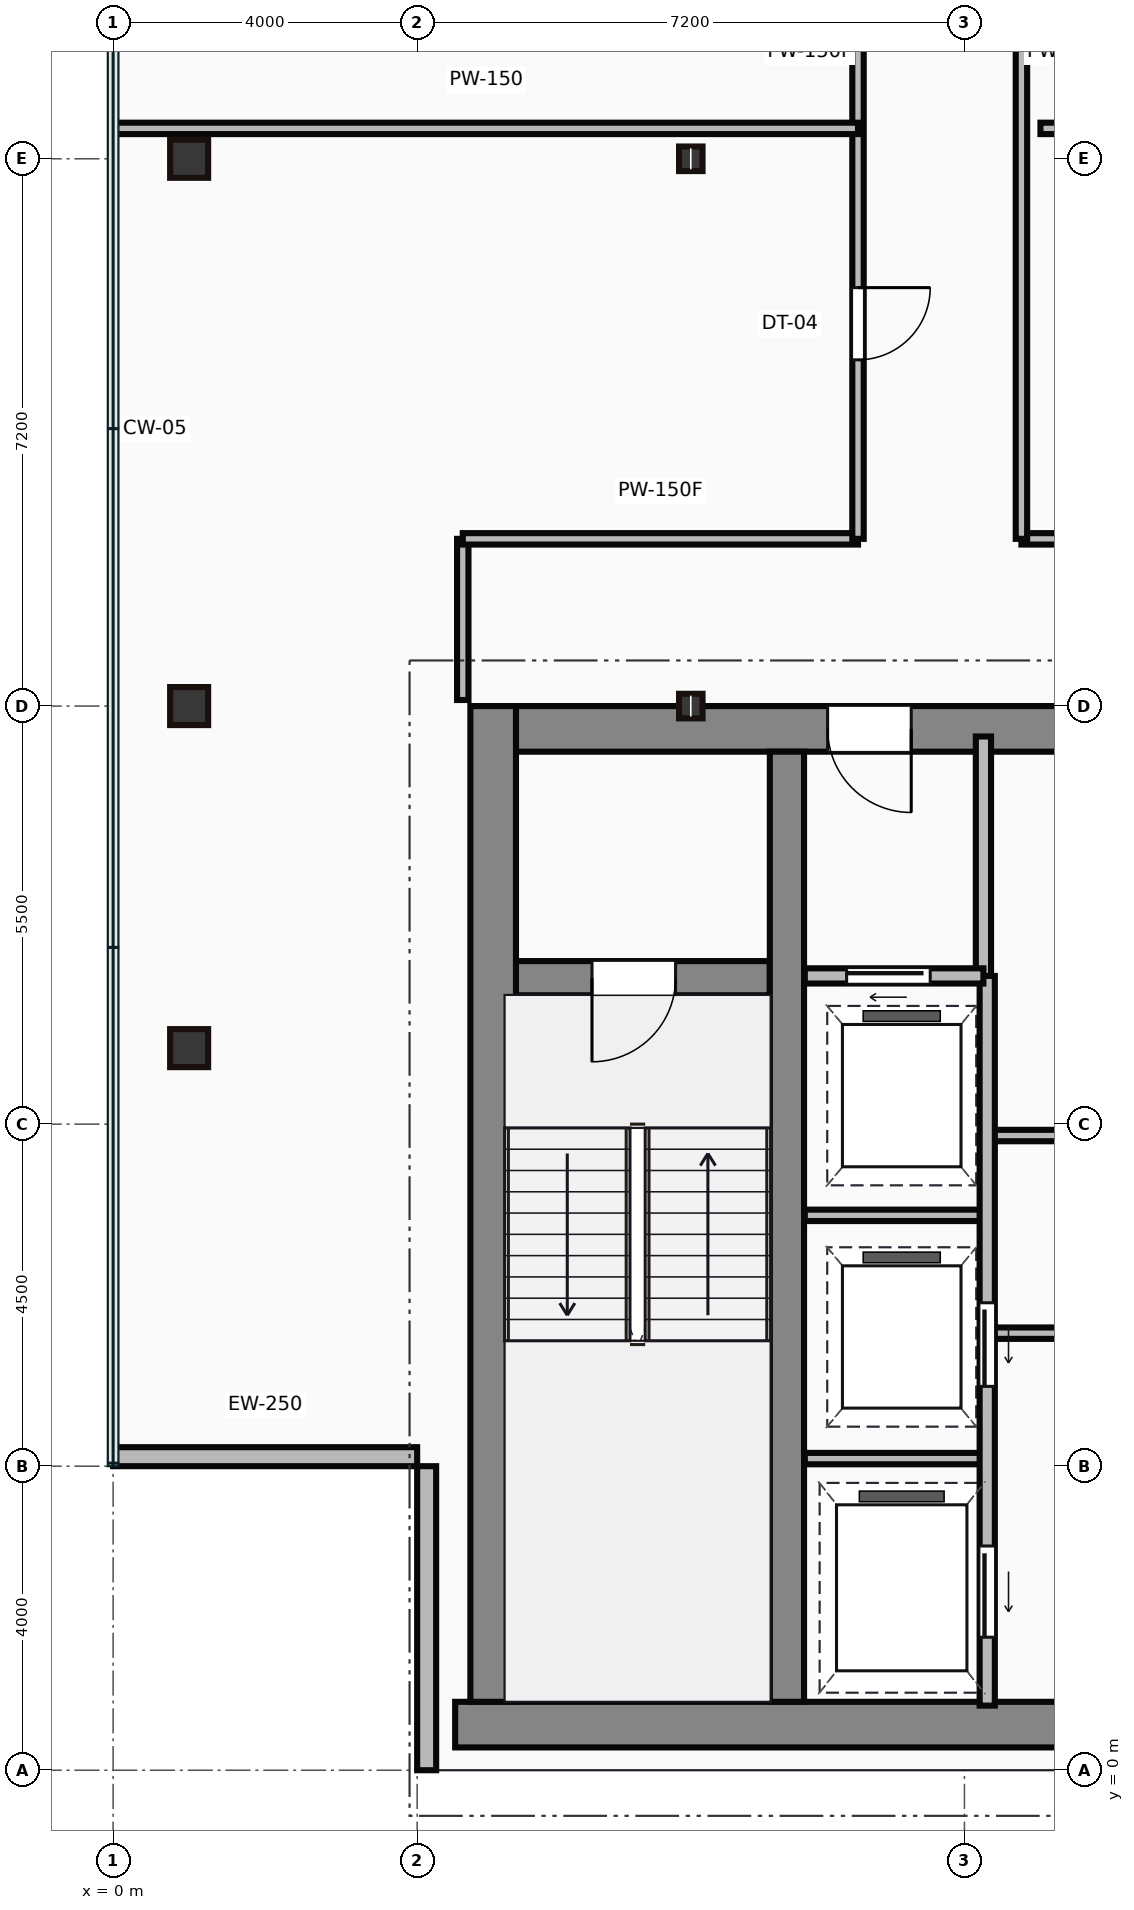
"""IFC4 building model, lengths in metres.
Left out: names, types, materials, properties, quantities, classifications, styles, units other than length and angle.
Written with IfcOpenShell. Run it as: python <this file> out.ifc"""

import sys

from ifc_helpers import new_model, si_unit, direction, frame, frame_2d, origin, origin_2d, place, context, subcontext, project, spatial, rectangle, hollow_rectangle, i_section, extrude, source, transform, mapped, element, fill, save


model = new_model("IFC4")
c1 = context("Model", 3, precision=1e-05, world=origin(), true_north=direction((0.0, 1.0)))
c2 = subcontext(c1, "Body", "Model", "MODEL_VIEW")
j1 = project(units=[si_unit("LENGTHUNIT", "METRE"), si_unit("PLANEANGLEUNIT", "RADIAN")], contexts=[c1])
p1 = place(None, origin())
s1 = spatial("IfcSite", under=j1, at=p1, CompositionType="ELEMENT")
p2 = place(p1, origin())
s2 = spatial("IfcBuilding", under=s1, at=p2, CompositionType="ELEMENT")
p3 = place(p2, frame((0.0, 0.0, 255.15)))
s3 = spatial("IfcBuildingStorey", under=s2, at=p3, CompositionType="ELEMENT", Elevation=255.15)
m1 = source(origin(), c2, "Body", "SweptSolid", [
    extrude(rectangle(XDim=29.5, YDim=0.6, at=frame_2d((14.75, 0.0))), origin(), (0.0, 0.0, 1.0), 3.65),
])
p4 = place(p3, frame((4.5, 0.6, 0.0), z_axis=(0.0, 0.0, 1.0), x_axis=(1.0, 0.0, 0.0)))
e1 = element("IfcWall", 1, at=p4, inside=s3, PredefinedType="SHEAR", context=c2, shape_type="MappedRepresentation", body=[
    mapped(m1, transform((0.0, 0.0, 0.0))),
])
m2 = source(origin(), c2, "Body", "SweptSolid", [
    extrude(rectangle(XDim=13.1, YDim=0.6, at=frame_2d((6.55, 0.0))), origin(), (0.0, 0.0, 1.0), 3.65),
])
p5 = place(p3, frame((5.0, 0.9, 0.0), z_axis=(0.0, 0.0, 1.0), x_axis=(0.0, 1.0, 0.0)))
e2 = element("IfcWall", 2, at=p5, inside=s3, PredefinedType="SHEAR", context=c2, shape_type="MappedRepresentation", body=[
    mapped(m2, transform((0.0, 0.0, 0.0))),
])
m3 = source(origin(), c2, "Body", "SweptSolid", [
    extrude(rectangle(XDim=9.1, YDim=0.6, at=frame_2d((4.55, 0.0))), origin(), (0.0, 0.0, 1.0), 3.65),
])
p6 = place(p3, frame((5.3, 13.7, 0.0), z_axis=(0.0, 0.0, 1.0), x_axis=(1.0, 0.0, 0.0)))
e3 = element("IfcWall", 3, at=p6, inside=s3, PredefinedType="SHEAR", context=c2, shape_type="MappedRepresentation", body=[
    mapped(m3, transform((0.0, 0.0, 0.0))),
])
p7 = place(p6, frame((4.1, 0.0, 0.0)))
e4 = element("IfcOpeningElement", 4, at=p7, cuts=e3, PredefinedType="OPENING", context=c2, shape_type="SweptSolid", body=[
    extrude(rectangle(XDim=1.1, YDim=2.15, at=frame_2d((0.55, 1.075))), frame((0.0, 0.31, 0.0), z_axis=(0.0, -1.0, 0.0), x_axis=(1.0, 0.0, 0.0)), (0.0, 0.0, 1.0), 0.62),
])
m4 = source(origin(), c2, "Body", "SweptSolid", [
    extrude(rectangle(XDim=12.5, YDim=0.45, at=frame_2d((6.25, 0.0))), origin(), (0.0, 0.0, 1.0), 3.65),
])
p8 = place(p3, frame((8.865, 0.9, 0.0), z_axis=(0.0, 0.0, 1.0), x_axis=(0.0, 1.0, 0.0)))
e5 = element("IfcWall", 5, at=p8, inside=s3, PredefinedType="SHEAR", context=c2, shape_type="MappedRepresentation", body=[
    mapped(m4, transform((0.0, 0.0, 0.0))),
])
m5 = source(origin(), c2, "Body", "SweptSolid", [
    extrude(rectangle(XDim=3.39, YDim=0.45, at=frame_2d((1.695, 0.0))), origin(), (0.0, 0.0, 1.0), 3.65),
])
p9 = place(p3, frame((5.25, 10.42, 0.0), z_axis=(0.0, 0.0, 1.0), x_axis=(1.0, 0.0, 0.0)))
e6 = element("IfcWall", 6, at=p9, inside=s3, PredefinedType="SHEAR", context=c2, shape_type="MappedRepresentation", body=[
    mapped(m5, transform((0.0, 0.0, 0.0))),
])
p10 = place(p9, frame((1.05, 0.0, 0.0)))
e7 = element("IfcOpeningElement", 7, at=p10, cuts=e6, PredefinedType="OPENING", context=c2, shape_type="SweptSolid", body=[
    extrude(rectangle(XDim=1.1, YDim=2.15, at=frame_2d((0.55, 1.075))), frame((0.0, 0.235, 0.0), z_axis=(0.0, -1.0, 0.0), x_axis=(1.0, 0.0, 0.0)), (0.0, 0.0, 1.0), 0.47),
])
m6 = source(origin(), c2, "Body", "SweptSolid", [
    extrude(hollow_rectangle(XDim=0.5, YDim=0.5, WallThickness=0.022, at=origin_2d()), origin(), (0.0, 0.0, 1.0), 3.65),
])
for number, where, z_axis, x_axis in (
    (8, (1.0, 9.5, 0.0), (0.0, 0.0, 1.0), (1.0, 0.0, 0.0)),
    (9, (1.0, 14.0, 0.0), (0.0, 0.0, 1.0), (1.0, 0.0, 0.0)),
    (10, (1.0, 21.2, 0.0), (0.0, 0.0, 1.0), (1.0, 0.0, 0.0)),
):
    element("IfcColumn", number, at=place(p3, frame(where, z_axis=z_axis, x_axis=x_axis)), inside=s3, PredefinedType="COLUMN", context=c2, shape_type="MappedRepresentation", body=[
        mapped(m6, transform((0.0, 0.0, 0.0))),
    ])
m7 = source(origin(), c2, "Body", "SweptSolid", [
    extrude(i_section(OverallWidth=0.309, OverallDepth=0.323, WebThickness=0.014, FlangeThickness=0.023, at=origin_2d()), origin(), (0.0, 0.0, 1.0), 3.65),
])
for number, where, z_axis, x_axis in (
    (11, (7.6, 14.0, 0.0), (0.0, 0.0, 1.0), (1.0, 0.0, 0.0)),
    (12, (7.6, 21.2, 0.0), (0.0, 0.0, 1.0), (1.0, 0.0, 0.0)),
):
    element("IfcColumn", number, at=place(p3, frame(where, z_axis=z_axis, x_axis=x_axis)), inside=s3, PredefinedType="COLUMN", context=c2, shape_type="MappedRepresentation", body=[
        mapped(m7, transform((0.0, 0.0, 0.0))),
    ])
m8 = source(origin(), c2, "Body", "SweptSolid", [
    extrude(rectangle(XDim=4.0, YDim=0.25, at=frame_2d((2.0, 0.0))), origin(), (0.0, 0.0, 1.0), 3.4),
])
for number, where, z_axis, x_axis in (
    (13, (0.0, 4.125, 0.0), (0.0, 0.0, 1.0), (1.0, 0.0, 0.0)),
    (14, (4.125, 4.0, 0.0), (0.0, 0.0, 1.0), (0.0, -1.0, 0.0)),
):
    element("IfcWall", number, at=place(p3, frame(where, z_axis=z_axis, x_axis=x_axis)), inside=s3, PredefinedType="STANDARD", context=c2, shape_type="MappedRepresentation", body=[
        mapped(m8, transform((0.0, 0.0, 0.0))),
    ])
m9 = source(origin(), c2, "Body", "SweptSolid", [
    extrude(rectangle(XDim=3.18, YDim=0.2, at=frame_2d((1.59, 0.0))), origin(), (0.0, 0.0, 1.0), 3.4),
])
p11 = place(p3, frame((11.45, 10.42, 0.0), z_axis=(0.0, 0.0, 1.0), x_axis=(0.0, 1.0, 0.0)))
e15 = element("IfcWall", 15, at=p11, inside=s3, PredefinedType="PARTITIONING", context=c2, shape_type="MappedRepresentation", body=[
    mapped(m9, transform((0.0, 0.0, 0.0))),
])
m10 = source(origin(), c2, "Body", "SweptSolid", [
    extrude(rectangle(XDim=2.35, YDim=0.2, at=frame_2d((1.175, 0.0))), origin(), (0.0, 0.0, 1.0), 3.4),
])
p12 = place(p3, frame((9.1, 10.45, 0.0), z_axis=(0.0, 0.0, 1.0), x_axis=(1.0, 0.0, 0.0)))
e16 = element("IfcWall", 16, at=p12, inside=s3, PredefinedType="PARTITIONING", context=c2, shape_type="MappedRepresentation", body=[
    mapped(m10, transform((0.0, 0.0, 0.0))),
])
p13 = place(p12, frame((0.55, 0.0, 0.0)))
e17 = element("IfcOpeningElement", 17, at=p13, cuts=e16, PredefinedType="OPENING", context=c2, shape_type="SweptSolid", body=[
    extrude(rectangle(XDim=1.1, YDim=2.15, at=frame_2d((0.55, 1.075))), frame((0.0, 0.11, 0.0), z_axis=(0.0, -1.0, 0.0), x_axis=(1.0, 0.0, 0.0)), (0.0, 0.0, 1.0), 0.22),
])
m11 = source(origin(), c2, "Body", "SweptSolid", [
    extrude(rectangle(XDim=9.6, YDim=0.2, at=frame_2d((4.8, 0.0))), origin(), (0.0, 0.0, 1.0), 3.4),
])
p14 = place(p3, frame((11.5, 0.85, 0.0), z_axis=(0.0, 0.0, 1.0), x_axis=(0.0, 1.0, 0.0)))
e18 = element("IfcWall", 18, at=p14, inside=s3, PredefinedType="PARTITIONING", context=c2, shape_type="MappedRepresentation", body=[
    mapped(m11, transform((0.0, 0.0, 0.0))),
])
p15 = place(p14, frame((4.2, 0.0, 0.0)))
e19 = element("IfcOpeningElement", 19, at=p15, cuts=e18, PredefinedType="OPENING", context=c2, shape_type="SweptSolid", body=[
    extrude(rectangle(XDim=1.1, YDim=2.15, at=frame_2d((0.55, 1.075))), frame((0.0, 0.11, 0.0), z_axis=(0.0, -1.0, 0.0), x_axis=(1.0, 0.0, 0.0)), (0.0, 0.0, 1.0), 0.22),
])
p16 = place(p14, frame((0.9, 0.0, 0.0)))
e20 = element("IfcOpeningElement", 20, at=p16, cuts=e18, PredefinedType="OPENING", context=c2, shape_type="SweptSolid", body=[
    extrude(rectangle(XDim=1.2, YDim=2.15, at=frame_2d((0.6, 1.075))), frame((0.0, 0.11, 0.0), z_axis=(0.0, -1.0, 0.0), x_axis=(1.0, 0.0, 0.0)), (0.0, 0.0, 1.0), 0.22),
])
m12 = source(origin(), c2, "Body", "SweptSolid", [
    extrude(rectangle(XDim=2.4, YDim=0.15, at=frame_2d((1.2, 0.0))), origin(), (0.0, 0.0, 1.0), 3.4),
])
for number, where, z_axis, x_axis in (
    (21, (9.1, 4.1, 0.0), (0.0, 0.0, 1.0), (1.0, 0.0, 0.0)),
    (22, (9.1, 7.3, 0.0), (0.0, 0.0, 1.0), (1.0, 0.0, 0.0)),
):
    element("IfcWall", number, at=place(p3, frame(where, z_axis=z_axis, x_axis=x_axis)), inside=s3, PredefinedType="PARTITIONING", context=c2, shape_type="MappedRepresentation", body=[
        mapped(m12, transform((0.0, 0.0, 0.0))),
    ])
m13 = source(origin(), c2, "Body", "SweptSolid", [
    extrude(rectangle(XDim=11.85, YDim=0.15, at=frame_2d((5.925, 0.0))), origin(), (0.0, 0.0, 1.0), 3.4),
])
p17 = place(p3, frame((11.55, 5.75, 0.0), z_axis=(0.0, 0.0, 1.0), x_axis=(1.0, 0.0, 0.0)))
e23 = element("IfcWall", 23, at=p17, inside=s3, PredefinedType="PARTITIONING", context=c2, shape_type="MappedRepresentation", body=[
    mapped(m13, transform((0.0, 0.0, 0.0))),
])
p18 = place(p3, frame((11.55, 8.35, 0.0), z_axis=(0.0, 0.0, 1.0), x_axis=(1.0, 0.0, 0.0)))
e24 = element("IfcWall", 24, at=p18, inside=s3, PredefinedType="PARTITIONING", context=c2, shape_type="MappedRepresentation", body=[
    mapped(m13, transform((0.0, 0.0, 0.0))),
])
p19 = place(p18, frame((1.1, 0.0, 0.0)))
e25 = element("IfcOpeningElement", 25, at=p19, cuts=e24, PredefinedType="OPENING", context=c2, shape_type="SweptSolid", body=[
    extrude(rectangle(XDim=0.95, YDim=2.15, at=frame_2d((0.475, 1.075))), frame((0.0, 0.085, 0.0), z_axis=(0.0, -1.0, 0.0), x_axis=(1.0, 0.0, 0.0)), (0.0, 0.0, 1.0), 0.17),
])
p20 = place(p18, frame((9.4, 0.0, 0.0)))
e26 = element("IfcOpeningElement", 26, at=p20, cuts=e24, PredefinedType="OPENING", context=c2, shape_type="SweptSolid", body=[
    extrude(rectangle(XDim=0.95, YDim=2.15, at=frame_2d((0.475, 1.075))), frame((0.0, 0.085, 0.0), z_axis=(0.0, -1.0, 0.0), x_axis=(1.0, 0.0, 0.0)), (0.0, 0.0, 1.0), 0.17),
])
m14 = source(origin(), c2, "Body", "SweptSolid", [
    extrude(rectangle(XDim=2.12, YDim=0.15, at=frame_2d((1.06, 0.0))), origin(), (0.0, 0.0, 1.0), 3.4),
])
p21 = place(p3, frame((4.6, 14.08, 0.0), z_axis=(0.0, 0.0, 1.0), x_axis=(0.0, 1.0, 0.0)))
e27 = element("IfcWall", 27, at=p21, inside=s3, PredefinedType="PARTITIONING", context=c2, shape_type="MappedRepresentation", body=[
    mapped(m14, transform((0.0, 0.0, 0.0))),
])
m15 = source(origin(), c2, "Body", "SweptSolid", [
    extrude(rectangle(XDim=5.2, YDim=0.15, at=frame_2d((2.6, 0.0))), origin(), (0.0, 0.0, 1.0), 3.4),
])
p22 = place(p3, frame((4.6, 16.2, 0.0), z_axis=(0.0, 0.0, 1.0), x_axis=(1.0, 0.0, 0.0)))
e28 = element("IfcWall", 28, at=p22, inside=s3, PredefinedType="PARTITIONING", context=c2, shape_type="MappedRepresentation", body=[
    mapped(m15, transform((0.0, 0.0, 0.0))),
])
m16 = source(origin(), c2, "Body", "SweptSolid", [
    extrude(rectangle(XDim=12.8, YDim=0.15, at=frame_2d((6.4, 0.0))), origin(), (0.0, 0.0, 1.0), 3.4),
])
p23 = place(p3, frame((9.8, 16.2, 0.0), z_axis=(0.0, 0.0, 1.0), x_axis=(0.0, 1.0, 0.0)))
e29 = element("IfcWall", 29, at=p23, inside=s3, PredefinedType="PARTITIONING", context=c2, shape_type="MappedRepresentation", body=[
    mapped(m16, transform((0.0, 0.0, 0.0))),
])
p24 = place(p23, frame((2.355, 0.0, 0.0)))
e30 = element("IfcOpeningElement", 30, at=p24, cuts=e29, PredefinedType="OPENING", context=c2, shape_type="SweptSolid", body=[
    extrude(rectangle(XDim=0.95, YDim=2.15, at=frame_2d((0.475, 1.075))), frame((0.0, 0.085, 0.0), z_axis=(0.0, -1.0, 0.0), x_axis=(1.0, 0.0, 0.0)), (0.0, 0.0, 1.0), 0.17),
])
p25 = place(p23, frame((8.495, 0.0, 0.0)))
e31 = element("IfcOpeningElement", 31, at=p25, cuts=e29, PredefinedType="OPENING", context=c2, shape_type="SweptSolid", body=[
    extrude(rectangle(XDim=0.95, YDim=2.15, at=frame_2d((0.475, 1.075))), frame((0.0, 0.085, 0.0), z_axis=(0.0, -1.0, 0.0), x_axis=(1.0, 0.0, 0.0)), (0.0, 0.0, 1.0), 0.17),
])
m17 = source(origin(), c2, "Body", "SweptSolid", [
    extrude(rectangle(XDim=11.65, YDim=0.15, at=frame_2d((5.825, 0.0))), origin(), (0.0, 0.0, 1.0), 3.4),
])
p26 = place(p3, frame((11.95, 16.2, 0.0), z_axis=(0.0, 0.0, 1.0), x_axis=(1.0, 0.0, 0.0)))
e32 = element("IfcWall", 32, at=p26, inside=s3, PredefinedType="PARTITIONING", context=c2, shape_type="MappedRepresentation", body=[
    mapped(m17, transform((0.0, 0.0, 0.0))),
])
p27 = place(p26, frame((5.35, 0.0, 0.0)))
e33 = element("IfcOpeningElement", 33, at=p27, cuts=e32, PredefinedType="OPENING", context=c2, shape_type="SweptSolid", body=[
    extrude(rectangle(XDim=0.95, YDim=2.15, at=frame_2d((0.475, 1.075))), frame((0.0, 0.085, 0.0), z_axis=(0.0, -1.0, 0.0), x_axis=(1.0, 0.0, 0.0)), (0.0, 0.0, 1.0), 0.17),
])
p28 = place(p3, frame((11.95, 29.0, 0.0), z_axis=(0.0, 0.0, 1.0), x_axis=(0.0, -1.0, 0.0)))
e34 = element("IfcWall", 34, at=p28, inside=s3, PredefinedType="PARTITIONING", context=c2, shape_type="MappedRepresentation", body=[
    mapped(m16, transform((0.0, 0.0, 0.0))),
])
m18 = source(origin(), c2, "Body", "SweptSolid", [
    extrude(rectangle(XDim=9.78, YDim=0.15, at=frame_2d((4.89, 0.0))), origin(), (0.0, 0.0, 1.0), 3.4),
])
p29 = place(p3, frame((0.02, 21.6, 0.0), z_axis=(0.0, 0.0, 1.0), x_axis=(1.0, 0.0, 0.0)))
e35 = element("IfcWall", 35, at=p29, inside=s3, PredefinedType="PARTITIONING", context=c2, shape_type="MappedRepresentation", body=[
    mapped(m18, transform((0.0, 0.0, 0.0))),
])
m19 = source(origin(), c2, "Body", "SweptSolid", [
    extrude(rectangle(XDim=11.4, YDim=0.15, at=frame_2d((5.7, 0.0))), origin(), (0.0, 0.0, 1.0), 3.4),
])
p30 = place(p3, frame((23.6, 21.6, 0.0), z_axis=(0.0, 0.0, 1.0), x_axis=(-1.0, 0.0, 0.0)))
e36 = element("IfcWall", 36, at=p30, inside=s3, PredefinedType="PARTITIONING", context=c2, shape_type="MappedRepresentation", body=[
    mapped(m19, transform((0.0, 0.0, 0.0))),
])
m20 = source(origin(), c2, "Body", "SweptSolid", [
    extrude(rectangle(XDim=1.1, YDim=2.15, at=frame_2d((0.55, 1.075))), frame((0.0, 0.025, 0.0), z_axis=(0.0, -1.0, 0.0), x_axis=(1.0, 0.0, 0.0)), (0.0, 0.0, 1.0), 0.05),
])
p31 = place(p10, frame((1.1, 0.0, 0.0), z_axis=(0.0, 0.0, 1.0), x_axis=(-1.0, 0.0, 0.0)))
e37 = element("IfcDoor", 37, at=p31, inside=s3, OperationType="SINGLE_SWING_LEFT", PredefinedType="DOOR", context=c2, shape_type="MappedRepresentation", body=[
    mapped(m20, transform((0.0, 0.0, 0.0))),
])
fill(e7, e37)
p32 = place(p7, origin())
e38 = element("IfcDoor", 38, at=p32, inside=s3, OperationType="SINGLE_SWING_RIGHT", PredefinedType="DOOR", context=c2, shape_type="MappedRepresentation", body=[
    mapped(m20, transform((0.0, 0.0, 0.0))),
])
fill(e4, e38)
p33 = place(p13, origin())
e39 = element("IfcDoor", 39, at=p33, inside=s3, OperationType="SLIDING_TO_LEFT", PredefinedType="DOOR", context=c2, shape_type="MappedRepresentation", body=[
    mapped(m20, transform((0.0, 0.0, 0.0))),
])
fill(e17, e39)
p34 = place(p15, frame((1.1, 0.0, 0.0), z_axis=(0.0, 0.0, 1.0), x_axis=(-1.0, 0.0, 0.0)))
e40 = element("IfcDoor", 40, at=p34, inside=s3, OperationType="SLIDING_TO_LEFT", PredefinedType="DOOR", context=c2, shape_type="MappedRepresentation", body=[
    mapped(m20, transform((0.0, 0.0, 0.0))),
])
fill(e19, e40)
m21 = source(origin(), c2, "Body", "SweptSolid", [
    extrude(rectangle(XDim=1.2, YDim=2.15, at=frame_2d((0.6, 1.075))), frame((0.0, 0.025, 0.0), z_axis=(0.0, -1.0, 0.0), x_axis=(1.0, 0.0, 0.0)), (0.0, 0.0, 1.0), 0.05),
])
p35 = place(p16, frame((1.2, 0.0, 0.0), z_axis=(0.0, 0.0, 1.0), x_axis=(-1.0, 0.0, 0.0)))
e41 = element("IfcDoor", 41, at=p35, inside=s3, OperationType="SLIDING_TO_LEFT", PredefinedType="DOOR", context=c2, shape_type="MappedRepresentation", body=[
    mapped(m21, transform((0.0, 0.0, 0.0))),
])
fill(e20, e41)
m22 = source(origin(), c2, "Body", "SweptSolid", [
    extrude(rectangle(XDim=0.95, YDim=2.15, at=frame_2d((0.475, 1.075))), frame((0.0, 0.025, 0.0), z_axis=(0.0, -1.0, 0.0), x_axis=(1.0, 0.0, 0.0)), (0.0, 0.0, 1.0), 0.05),
])
p36 = place(p24, origin())
e42 = element("IfcDoor", 42, at=p36, inside=s3, OperationType="SINGLE_SWING_RIGHT", PredefinedType="DOOR", context=c2, shape_type="MappedRepresentation", body=[
    mapped(m22, transform((0.0, 0.0, 0.0))),
])
fill(e30, e42)
save(model, sys.argv[1])
